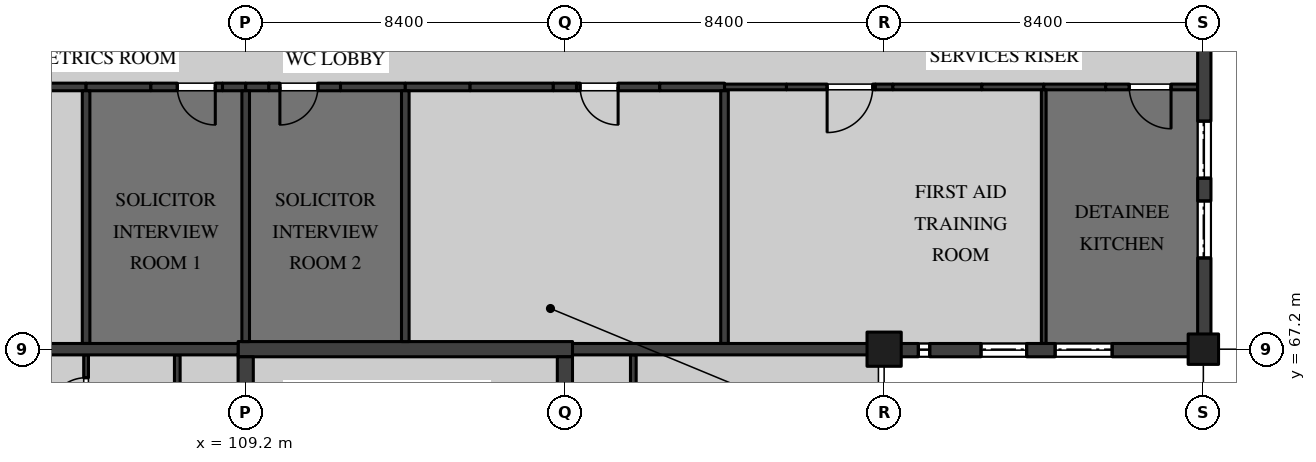
"""IFC4 building model, lengths in metres.
Left out: names, types, materials, properties, quantities, classifications, styles, units other than length and angle.
Written with IfcOpenShell. Run it as: python <this file> out.ifc"""

import sys

from ifc_helpers import new_model, si_unit, direction, frame, frame_2d, origin, origin_2d, place, context, subcontext, project, spatial, rectangle, extrude, element, fill, save


model = new_model("IFC4")
c1 = context("Model", 3, precision=1e-05, world=origin(), true_north=direction((0.0, 1.0)))
c2 = subcontext(c1, "Body", "Model", "MODEL_VIEW")
j1 = project(units=[si_unit("LENGTHUNIT", "METRE"), si_unit("PLANEANGLEUNIT", "RADIAN")], contexts=[c1])
p1 = place(None, origin())
s1 = spatial("IfcSite", under=j1, at=p1, CompositionType="ELEMENT")
p2 = place(p1, origin())
s2 = spatial("IfcBuilding", under=s1, at=p2, CompositionType="ELEMENT")
p3 = place(p2, frame((0.0, 0.0, 5.4)))
s3 = spatial("IfcBuildingStorey", under=s2, at=p3, CompositionType="ELEMENT", Elevation=5.4)
p4 = place(p3, frame((126.0, 67.2, 0.0), z_axis=(0.0, 0.0, 1.0), x_axis=(1.0, 0.0, 0.0)))
e1 = element("IfcColumn", 1, at=p4, inside=s3, PredefinedType="COLUMN", context=c2, shape_type="SweptSolid", body=[
    extrude(rectangle(XDim=0.9, YDim=0.9, at=origin_2d()), origin(), (0.0, 0.0, 1.0), 4.37),
])
p5 = place(p3, frame((134.4, 67.2, 0.0), z_axis=(0.0, 0.0, 1.0), x_axis=(1.0, 0.0, 0.0)))
e2 = element("IfcColumn", 2, at=p5, inside=s3, PredefinedType="COLUMN", context=c2, shape_type="SweptSolid", body=[
    extrude(rectangle(XDim=0.8, YDim=0.8, at=origin_2d()), origin(), (0.0, 0.0, 1.0), 4.37),
])
p6 = place(p3, frame((109.0, 67.2, 0.0), z_axis=(0.0, 0.0, 1.0), x_axis=(1.0, 0.0, 0.0)))
e3 = element("IfcWall", 3, at=p6, inside=s3, PredefinedType="SHEAR", context=c2, shape_type="SweptSolid", body=[
    extrude(rectangle(XDim=8.8, YDim=0.4, at=frame_2d((4.4, 0.0))), origin(), (0.0, 0.0, 1.0), 4.37),
])
p7 = place(p3, frame((109.2, 59.0, 0.0), z_axis=(0.0, 0.0, 1.0), x_axis=(0.0, 1.0, 0.0)))
e4 = element("IfcWall", 4, at=p7, inside=s3, PredefinedType="SHEAR", context=c2, shape_type="SweptSolid", body=[
    extrude(rectangle(XDim=8.0, YDim=0.4, at=frame_2d((4.0, 0.0))), origin(), (0.0, 0.0, 1.0), 4.37),
])
p8 = place(p7, frame((2.925, 0.0, 0.0)))
e5 = element("IfcOpeningElement", 5, at=p8, cuts=e4, PredefinedType="OPENING", context=c2, shape_type="SweptSolid", body=[
    extrude(rectangle(XDim=1.2, YDim=2.1, at=frame_2d((0.6, 1.05))), frame((0.0, 0.21, 0.0), z_axis=(0.0, -1.0, 0.0), x_axis=(1.0, 0.0, 0.0)), (0.0, 0.0, 1.0), 0.42),
])
p9 = place(p3, frame((117.6, 59.0, 0.0), z_axis=(0.0, 0.0, 1.0), x_axis=(0.0, 1.0, 0.0)))
e6 = element("IfcWall", 6, at=p9, inside=s3, PredefinedType="SHEAR", context=c2, shape_type="SweptSolid", body=[
    extrude(rectangle(XDim=8.0, YDim=0.4, at=frame_2d((4.0, 0.0))), origin(), (0.0, 0.0, 1.0), 4.37),
])
p10 = place(p9, frame((2.925, 0.0, 0.0)))
e7 = element("IfcOpeningElement", 7, at=p10, cuts=e6, PredefinedType="OPENING", context=c2, shape_type="SweptSolid", body=[
    extrude(rectangle(XDim=1.2, YDim=2.1, at=frame_2d((0.6, 1.05))), frame((0.0, 0.21, 0.0), z_axis=(0.0, -1.0, 0.0), x_axis=(1.0, 0.0, 0.0)), (0.0, 0.0, 1.0), 0.42),
])
p11 = place(p3, frame((119.4, 59.03, 0.0), z_axis=(0.0, 0.0, 1.0), x_axis=(0.0, 1.0, 0.0)))
e8 = element("IfcWall", 8, at=p11, inside=s3, PredefinedType="PARTITIONING", context=c2, shape_type="SweptSolid", body=[
    extrude(rectangle(XDim=8.02, YDim=0.15, at=frame_2d((4.01, 0.0))), origin(), (0.0, 0.0, 1.0), 4.37),
])
p12 = place(p11, frame((0.17, 0.0, 0.0)))
e9 = element("IfcOpeningElement", 9, at=p12, cuts=e8, PredefinedType="OPENING", context=c2, shape_type="SweptSolid", body=[
    extrude(rectangle(XDim=1.35, YDim=2.1, at=frame_2d((0.675, 1.05))), frame((0.0, 0.085, 0.0), z_axis=(0.0, -1.0, 0.0), x_axis=(1.0, 0.0, 0.0)), (0.0, 0.0, 1.0), 0.17),
])
p13 = place(p3, frame((107.4, 59.26, 0.0), z_axis=(0.0, 0.0, 1.0), x_axis=(0.0, 1.0, 0.0)))
e10 = element("IfcWall", 10, at=p13, inside=s3, PredefinedType="PARTITIONING", context=c2, shape_type="SweptSolid", body=[
    extrude(rectangle(XDim=7.79, YDim=0.15, at=frame_2d((3.895, 0.0))), origin(), (0.0, 0.0, 1.0), 4.37),
])
p14 = place(p13, frame((2.09, 0.0, 0.0)))
e11 = element("IfcOpeningElement", 11, at=p14, cuts=e10, PredefinedType="OPENING", context=c2, shape_type="SweptSolid", body=[
    extrude(rectangle(XDim=0.9, YDim=2.1, at=frame_2d((0.45, 1.05))), frame((0.0, 0.085, 0.0), z_axis=(0.0, -1.0, 0.0), x_axis=(1.0, 0.0, 0.0)), (0.0, 0.0, 1.0), 0.17),
])
p15 = place(p3, frame((105.0, 64.8, 0.0), z_axis=(0.0, 0.0, 1.0), x_axis=(0.0, 1.0, 0.0)))
e12 = element("IfcWall", 12, at=p15, inside=s3, PredefinedType="PARTITIONING", context=c2, shape_type="SweptSolid", body=[
    extrude(rectangle(XDim=2.25, YDim=0.125, at=frame_2d((1.125, 0.0))), origin(), (0.0, 0.0, 1.0), 4.37),
])
p16 = place(p15, frame((0.65, 0.0, 0.0)))
e13 = element("IfcOpeningElement", 13, at=p16, cuts=e12, PredefinedType="OPENING", context=c2, shape_type="SweptSolid", body=[
    extrude(rectangle(XDim=1.0, YDim=2.1, at=frame_2d((0.5, 1.05))), frame((0.0, 0.073, 0.0), z_axis=(0.0, -1.0, 0.0), x_axis=(1.0, 0.0, 0.0)), (0.0, 0.0, 1.0), 0.145),
])
for number, where, z_axis, x_axis in (
    (14, (103.295, 74.1, 0.0), (0.0, 0.0, 1.0), (1.0, 0.0, 0.0)),
    (15, (105.0, 74.1, 0.0), (0.0, 0.0, 1.0), (1.0, 0.0, 0.0)),
):
    element("IfcWall", number, at=place(p3, frame(where, z_axis=z_axis, x_axis=x_axis)), inside=s3, PredefinedType="PARTITIONING", context=c2, shape_type="SweptSolid", body=[
        extrude(rectangle(XDim=1.705, YDim=0.2, at=frame_2d((0.853, 0.0))), origin(), (0.0, 0.0, 1.0), 3.895),
    ])
p17 = place(p3, frame((106.705, 74.1, 0.0), z_axis=(0.0, 0.0, 1.0), x_axis=(1.0, 0.0, 0.0)))
e16 = element("IfcWall", 16, at=p17, inside=s3, PredefinedType="PARTITIONING", context=c2, shape_type="SweptSolid", body=[
    extrude(rectangle(XDim=1.885, YDim=0.2, at=frame_2d((0.942, 0.0))), origin(), (0.0, 0.0, 1.0), 4.37),
])
p18 = place(p17, frame((0.695, 0.0, 0.0)))
e17 = element("IfcOpeningElement", 17, at=p18, cuts=e16, PredefinedType="OPENING", context=c2, shape_type="SweptSolid", body=[
    extrude(rectangle(XDim=1.0, YDim=2.1, at=frame_2d((0.5, 1.05))), frame((0.0, 0.11, 0.0), z_axis=(0.0, -1.0, 0.0), x_axis=(1.0, 0.0, 0.0)), (0.0, 0.0, 1.0), 0.22),
])
p19 = place(p3, frame((108.59, 74.1, 0.0), z_axis=(0.0, 0.0, 1.0), x_axis=(1.0, 0.0, 0.0)))
e18 = element("IfcWall", 18, at=p19, inside=s3, PredefinedType="PARTITIONING", context=c2, shape_type="SweptSolid", body=[
    extrude(rectangle(XDim=0.61, YDim=0.2, at=frame_2d((0.305, 0.0))), origin(), (0.0, 0.0, 1.0), 3.746),
])
p20 = place(p3, frame((109.2, 74.1, 0.0), z_axis=(0.0, 0.0, 1.0), x_axis=(1.0, 0.0, 0.0)))
e19 = element("IfcWall", 19, at=p20, inside=s3, PredefinedType="PARTITIONING", context=c2, shape_type="SweptSolid", body=[
    extrude(rectangle(XDim=0.61, YDim=0.2, at=frame_2d((0.305, 0.0))), origin(), (0.0, 0.0, 1.0), 3.746),
])
p21 = place(p3, frame((109.81, 74.1, 0.0), z_axis=(0.0, 0.0, 1.0), x_axis=(1.0, 0.0, 0.0)))
e20 = element("IfcWall", 20, at=p21, inside=s3, PredefinedType="PARTITIONING", context=c2, shape_type="SweptSolid", body=[
    extrude(rectangle(XDim=1.885, YDim=0.2, at=frame_2d((0.942, 0.0))), origin(), (0.0, 0.0, 1.0), 4.37),
])
p22 = place(p21, frame((0.29, 0.0, 0.0)))
e21 = element("IfcOpeningElement", 21, at=p22, cuts=e20, PredefinedType="OPENING", context=c2, shape_type="SweptSolid", body=[
    extrude(rectangle(XDim=1.0, YDim=2.1, at=frame_2d((0.5, 1.05))), frame((0.0, 0.11, 0.0), z_axis=(0.0, -1.0, 0.0), x_axis=(1.0, 0.0, 0.0)), (0.0, 0.0, 1.0), 0.22),
])
p23 = place(p3, frame((111.695, 74.1, 0.0), z_axis=(0.0, 0.0, 1.0), x_axis=(1.0, 0.0, 0.0)))
e22 = element("IfcWall", 22, at=p23, inside=s3, PredefinedType="PARTITIONING", context=c2, shape_type="SweptSolid", body=[
    extrude(rectangle(XDim=1.705, YDim=0.2, at=frame_2d((0.853, 0.0))), origin(), (0.0, 0.0, 1.0), 3.895),
])
p24 = place(p3, frame((113.4, 74.1, 0.0), z_axis=(0.0, 0.0, 1.0), x_axis=(1.0, 0.0, 0.0)))
e23 = element("IfcWall", 23, at=p24, inside=s3, PredefinedType="PARTITIONING", context=c2, shape_type="SweptSolid", body=[
    extrude(rectangle(XDim=1.705, YDim=0.2, at=frame_2d((0.853, 0.0))), origin(), (0.0, 0.0, 1.0), 3.895),
])
p25 = place(p3, frame((115.105, 74.1, 0.0), z_axis=(0.0, 0.0, 1.0), x_axis=(1.0, 0.0, 0.0)))
e24 = element("IfcWall", 24, at=p25, inside=s3, PredefinedType="PARTITIONING", context=c2, shape_type="SweptSolid", body=[
    extrude(rectangle(XDim=2.19, YDim=0.2, at=frame_2d((1.095, 0.0))), origin(), (0.0, 0.0, 1.0), 4.37),
])
p26 = place(p3, frame((117.295, 74.1, 0.0), z_axis=(0.0, 0.0, 1.0), x_axis=(1.0, 0.0, 0.0)))
e25 = element("IfcWall", 25, at=p26, inside=s3, PredefinedType="PARTITIONING", context=c2, shape_type="SweptSolid", body=[
    extrude(rectangle(XDim=0.61, YDim=0.2, at=frame_2d((0.305, 0.0))), origin(), (0.0, 0.0, 1.0), 3.746),
])
p27 = place(p3, frame((117.905, 74.1, 0.0), z_axis=(0.0, 0.0, 1.0), x_axis=(1.0, 0.0, 0.0)))
e26 = element("IfcWall", 26, at=p27, inside=s3, PredefinedType="PARTITIONING", context=c2, shape_type="SweptSolid", body=[
    extrude(rectangle(XDim=2.19, YDim=0.2, at=frame_2d((1.095, 0.0))), origin(), (0.0, 0.0, 1.0), 4.37),
])
p28 = place(p27, frame((0.095, 0.0, 0.0)))
e27 = element("IfcOpeningElement", 27, at=p28, cuts=e26, PredefinedType="OPENING", context=c2, shape_type="SweptSolid", body=[
    extrude(rectangle(XDim=1.0, YDim=2.1, at=frame_2d((0.5, 1.05))), frame((0.0, 0.11, 0.0), z_axis=(0.0, -1.0, 0.0), x_axis=(1.0, 0.0, 0.0)), (0.0, 0.0, 1.0), 0.22),
])
p29 = place(p3, frame((120.095, 74.1, 0.0), z_axis=(0.0, 0.0, 1.0), x_axis=(1.0, 0.0, 0.0)))
e28 = element("IfcWall", 28, at=p29, inside=s3, PredefinedType="PARTITIONING", context=c2, shape_type="SweptSolid", body=[
    extrude(rectangle(XDim=1.705, YDim=0.2, at=frame_2d((0.853, 0.0))), origin(), (0.0, 0.0, 1.0), 3.895),
])
p30 = place(p3, frame((121.8, 74.1, 0.0), z_axis=(0.0, 0.0, 1.0), x_axis=(1.0, 0.0, 0.0)))
e29 = element("IfcWall", 29, at=p30, inside=s3, PredefinedType="PARTITIONING", context=c2, shape_type="SweptSolid", body=[
    extrude(rectangle(XDim=1.63, YDim=0.15, at=frame_2d((0.815, 0.0))), origin(), (0.0, 0.0, 1.0), 3.895),
])
p31 = place(p3, frame((123.43, 74.1, 0.0), z_axis=(0.0, 0.0, 1.0), x_axis=(1.0, 0.0, 0.0)))
e30 = element("IfcWall", 30, at=p31, inside=s3, PredefinedType="PARTITIONING", context=c2, shape_type="SweptSolid", body=[
    extrude(rectangle(XDim=2.34, YDim=0.15, at=frame_2d((1.17, 0.0))), origin(), (0.0, 0.0, 1.0), 4.37),
])
p32 = place(p31, frame((1.07, 0.0, 0.0)))
e31 = element("IfcOpeningElement", 31, at=p32, cuts=e30, PredefinedType="OPENING", context=c2, shape_type="SweptSolid", body=[
    extrude(rectangle(XDim=1.2, YDim=2.4, at=frame_2d((0.6, 1.2))), frame((0.0, 0.085, 0.0), z_axis=(0.0, -1.0, 0.0), x_axis=(1.0, 0.0, 0.0)), (0.0, 0.0, 1.0), 0.17),
])
p33 = place(p3, frame((125.77, 74.1, 0.0), z_axis=(0.0, 0.0, 1.0), x_axis=(1.0, 0.0, 0.0)))
e32 = element("IfcWall", 32, at=p33, inside=s3, PredefinedType="PARTITIONING", context=c2, shape_type="SweptSolid", body=[
    extrude(rectangle(XDim=0.46, YDim=0.15, at=frame_2d((0.23, 0.0))), origin(), (0.0, 0.0, 1.0), 3.746),
])
p34 = place(p3, frame((126.23, 74.1, 0.0), z_axis=(0.0, 0.0, 1.0), x_axis=(1.0, 0.0, 0.0)))
e33 = element("IfcWall", 33, at=p34, inside=s3, PredefinedType="PARTITIONING", context=c2, shape_type="SweptSolid", body=[
    extrude(rectangle(XDim=2.34, YDim=0.15, at=frame_2d((1.17, 0.0))), origin(), (0.0, 0.0, 1.0), 4.37),
])
p35 = place(p3, frame((128.57, 74.1, 0.0), z_axis=(0.0, 0.0, 1.0), x_axis=(1.0, 0.0, 0.0)))
e34 = element("IfcWall", 34, at=p35, inside=s3, PredefinedType="PARTITIONING", context=c2, shape_type="SweptSolid", body=[
    extrude(rectangle(XDim=1.63, YDim=0.15, at=frame_2d((0.815, 0.0))), origin(), (0.0, 0.0, 1.0), 3.895),
])
p36 = place(p3, frame((130.2, 74.1, 0.0), z_axis=(0.0, 0.0, 1.0), x_axis=(1.0, 0.0, 0.0)))
e35 = element("IfcWall", 35, at=p36, inside=s3, PredefinedType="PARTITIONING", context=c2, shape_type="SweptSolid", body=[
    extrude(rectangle(XDim=1.63, YDim=0.15, at=frame_2d((0.815, 0.0))), origin(), (0.0, 0.0, 1.0), 3.895),
])
p37 = place(p3, frame((131.83, 74.1, 0.0), z_axis=(0.0, 0.0, 1.0), x_axis=(1.0, 0.0, 0.0)))
e36 = element("IfcWall", 36, at=p37, inside=s3, PredefinedType="PARTITIONING", context=c2, shape_type="SweptSolid", body=[
    extrude(rectangle(XDim=2.42, YDim=0.15, at=frame_2d((1.21, 0.0))), origin(), (0.0, 0.0, 1.0), 4.37),
])
p38 = place(p37, frame((0.62, 0.0, 0.0)))
e37 = element("IfcOpeningElement", 37, at=p38, cuts=e36, PredefinedType="OPENING", context=c2, shape_type="SweptSolid", body=[
    extrude(rectangle(XDim=1.1, YDim=2.1, at=frame_2d((0.55, 1.05))), frame((0.0, 0.085, 0.0), z_axis=(0.0, -1.0, 0.0), x_axis=(1.0, 0.0, 0.0)), (0.0, 0.0, 1.0), 0.17),
])
p39 = place(p3, frame((105.0, 67.35, 0.0), z_axis=(0.0, 0.0, 1.0), x_axis=(0.0, 1.0, 0.0)))
e38 = element("IfcWall", 38, at=p39, inside=s3, PredefinedType="PARTITIONING", context=c2, shape_type="SweptSolid", body=[
    extrude(rectangle(XDim=6.65, YDim=0.2, at=frame_2d((3.325, 0.0))), origin(), (0.0, 0.0, 1.0), 4.37),
])
p40 = place(p3, frame((109.2, 67.4, 0.0), z_axis=(0.0, 0.0, 1.0), x_axis=(0.0, 1.0, 0.0)))
e39 = element("IfcWall", 39, at=p40, inside=s3, PredefinedType="PARTITIONING", context=c2, shape_type="SweptSolid", body=[
    extrude(rectangle(XDim=6.6, YDim=0.2, at=frame_2d((3.3, 0.0))), origin(), (0.0, 0.0, 1.0), 3.746),
])
p41 = place(p3, frame((113.4, 67.4, 0.0), z_axis=(0.0, 0.0, 1.0), x_axis=(0.0, 1.0, 0.0)))
e40 = element("IfcWall", 40, at=p41, inside=s3, PredefinedType="PARTITIONING", context=c2, shape_type="SweptSolid", body=[
    extrude(rectangle(XDim=6.6, YDim=0.2, at=frame_2d((3.3, 0.0))), origin(), (0.0, 0.0, 1.0), 4.37),
])
p42 = place(p3, frame((121.8, 67.35, 0.0), z_axis=(0.0, 0.0, 1.0), x_axis=(0.0, 1.0, 0.0)))
e41 = element("IfcWall", 41, at=p42, inside=s3, PredefinedType="PARTITIONING", context=c2, shape_type="SweptSolid", body=[
    extrude(rectangle(XDim=6.65, YDim=0.2, at=frame_2d((3.325, 0.0))), origin(), (0.0, 0.0, 1.0), 4.37),
])
p43 = place(p3, frame((130.2, 67.35, 0.0), z_axis=(0.0, 0.0, 1.0), x_axis=(0.0, 1.0, 0.0)))
e42 = element("IfcWall", 42, at=p43, inside=s3, PredefinedType="PARTITIONING", context=c2, shape_type="SweptSolid", body=[
    extrude(rectangle(XDim=6.675, YDim=0.125, at=frame_2d((3.337, 0.0))), origin(), (0.0, 0.0, 1.0), 4.37),
])
p44 = place(p3, frame((126.43, 67.175, 0.0), z_axis=(0.0, 0.0, 1.0), x_axis=(1.0, 0.0, 0.0)))
e43 = element("IfcWall", 43, at=p44, inside=s3, PredefinedType="SOLIDWALL", context=c2, shape_type="SweptSolid", body=[
    extrude(rectangle(XDim=7.59, YDim=0.35, at=frame_2d((3.795, 0.0))), origin(), (0.0, 0.0, 1.0), 3.746),
])
p45 = place(p44, frame((0.47, 0.0, 1.5)))
e44 = element("IfcOpeningElement", 44, at=p45, cuts=e43, PredefinedType="OPENING", context=c2, shape_type="SweptSolid", body=[
    extrude(rectangle(XDim=0.3, YDim=1.5, at=frame_2d((0.15, 0.75))), frame((0.0, 0.185, 0.0), z_axis=(0.0, -1.0, 0.0), x_axis=(1.0, 0.0, 0.0)), (0.0, 0.0, 1.0), 0.37),
])
p46 = place(p44, frame((2.12, 0.0, 1.5)))
e45 = element("IfcOpeningElement", 45, at=p46, cuts=e43, PredefinedType="OPENING", context=c2, shape_type="SweptSolid", body=[
    extrude(rectangle(XDim=1.2, YDim=1.5, at=frame_2d((0.6, 0.75))), frame((0.0, 0.185, 0.0), z_axis=(0.0, -1.0, 0.0), x_axis=(1.0, 0.0, 0.0)), (0.0, 0.0, 1.0), 0.37),
])
p47 = place(p44, frame((4.07, 0.0, 1.5)))
e46 = element("IfcOpeningElement", 46, at=p47, cuts=e43, PredefinedType="OPENING", context=c2, shape_type="SweptSolid", body=[
    extrude(rectangle(XDim=1.5, YDim=1.5, at=frame_2d((0.75, 0.75))), frame((0.0, 0.185, 0.0), z_axis=(0.0, -1.0, 0.0), x_axis=(1.0, 0.0, 0.0)), (0.0, 0.0, 1.0), 0.37),
])
p48 = place(p3, frame((134.425, 67.58, 0.0), z_axis=(0.0, 0.0, 1.0), x_axis=(0.0, 1.0, 0.0)))
e47 = element("IfcWall", 47, at=p48, inside=s3, PredefinedType="SOLIDWALL", context=c2, shape_type="SweptSolid", body=[
    extrude(rectangle(XDim=7.82, YDim=0.35, at=frame_2d((3.91, 0.0))), origin(), (0.0, 0.0, 1.0), 3.746),
])
p49 = place(p48, frame((2.02, 0.0, 1.5)))
e48 = element("IfcOpeningElement", 48, at=p49, cuts=e47, PredefinedType="OPENING", context=c2, shape_type="SweptSolid", body=[
    extrude(rectangle(XDim=1.5, YDim=1.65, at=frame_2d((0.75, 0.825))), frame((0.0, 0.185, 0.0), z_axis=(0.0, -1.0, 0.0), x_axis=(1.0, 0.0, 0.0)), (0.0, 0.0, 1.0), 0.37),
])
p50 = place(p48, frame((4.12, 0.0, 1.5)))
e49 = element("IfcOpeningElement", 49, at=p50, cuts=e47, PredefinedType="OPENING", context=c2, shape_type="SweptSolid", body=[
    extrude(rectangle(XDim=1.5, YDim=1.65, at=frame_2d((0.75, 0.825))), frame((0.0, 0.185, 0.0), z_axis=(0.0, -1.0, 0.0), x_axis=(1.0, 0.0, 0.0)), (0.0, 0.0, 1.0), 0.37),
])
for number, where, z_axis, x_axis in (
    (50, (125.57, 67.2, 0.0), (0.0, 0.0, 1.0), (-1.0, 0.0, 0.0)),
    (51, (109.0, 67.2, 0.0), (0.0, 0.0, 1.0), (-1.0, 0.0, 0.0)),
):
    element("IfcWall", number, at=place(p3, frame(where, z_axis=z_axis, x_axis=x_axis)), inside=s3, PredefinedType="SOLIDWALL", context=c2, shape_type="SweptSolid", body=[
        extrude(rectangle(XDim=7.77, YDim=0.3, at=frame_2d((3.885, 0.0))), origin(), (0.0, 0.0, 1.0), 3.746),
    ])
p51 = place(p16, origin())
e52 = element("IfcDoor", 52, at=p51, inside=s3, OperationType="SINGLE_SWING_RIGHT", PredefinedType="DOOR", context=c2, shape_type="SweptSolid", body=[
    extrude(rectangle(XDim=1.0, YDim=2.1, at=frame_2d((0.5, 1.05))), frame((0.0, 0.02, 0.0), z_axis=(0.0, -1.0, 0.0), x_axis=(1.0, 0.0, 0.0)), (0.0, 0.0, 1.0), 0.04),
])
fill(e13, e52)
p52 = place(p18, frame((1.0, 0.0, 0.0), z_axis=(0.0, 0.0, 1.0), x_axis=(-1.0, 0.0, 0.0)))
e53 = element("IfcDoor", 53, at=p52, inside=s3, OperationType="SINGLE_SWING_RIGHT", PredefinedType="DOOR", context=c2, shape_type="SweptSolid", body=[
    extrude(rectangle(XDim=1.0, YDim=2.1, at=frame_2d((0.5, 1.05))), frame((0.0, 0.045, 0.0), z_axis=(0.0, -1.0, 0.0), x_axis=(1.0, 0.0, 0.0)), (0.0, 0.0, 1.0), 0.09),
])
fill(e17, e53)
p53 = place(p22, frame((1.0, 0.0, 0.0), z_axis=(0.0, 0.0, 1.0), x_axis=(-1.0, 0.0, 0.0)))
e54 = element("IfcDoor", 54, at=p53, inside=s3, OperationType="SINGLE_SWING_LEFT", PredefinedType="DOOR", context=c2, shape_type="SweptSolid", body=[
    extrude(rectangle(XDim=1.0, YDim=2.1, at=frame_2d((0.5, 1.05))), frame((0.0, 0.045, 0.0), z_axis=(0.0, -1.0, 0.0), x_axis=(1.0, 0.0, 0.0)), (0.0, 0.0, 1.0), 0.09),
])
fill(e21, e54)
p54 = place(p28, frame((1.0, 0.0, 0.0), z_axis=(0.0, 0.0, 1.0), x_axis=(-1.0, 0.0, 0.0)))
e55 = element("IfcDoor", 55, at=p54, inside=s3, OperationType="SINGLE_SWING_RIGHT", PredefinedType="DOOR", context=c2, shape_type="SweptSolid", body=[
    extrude(rectangle(XDim=1.0, YDim=2.1, at=frame_2d((0.5, 1.05))), frame((0.0, 0.045, 0.0), z_axis=(0.0, -1.0, 0.0), x_axis=(1.0, 0.0, 0.0)), (0.0, 0.0, 1.0), 0.09),
])
fill(e27, e55)
p55 = place(p32, frame((1.2, 0.0, 0.0), z_axis=(0.0, 0.0, 1.0), x_axis=(-1.0, 0.0, 0.0)))
e56 = element("IfcDoor", 56, at=p55, inside=s3, OperationType="SINGLE_SWING_LEFT", PredefinedType="DOOR", context=c2, shape_type="SweptSolid", body=[
    extrude(rectangle(XDim=1.2, YDim=2.4, at=frame_2d((0.6, 1.2))), frame((0.0, 0.025, 0.0), z_axis=(0.0, -1.0, 0.0), x_axis=(1.0, 0.0, 0.0)), (0.0, 0.0, 1.0), 0.05),
])
fill(e31, e56)
p56 = place(p38, frame((1.1, 0.0, 0.0), z_axis=(0.0, 0.0, 1.0), x_axis=(-1.0, 0.0, 0.0)))
e57 = element("IfcDoor", 57, at=p56, inside=s3, OperationType="SINGLE_SWING_RIGHT", PredefinedType="DOOR", context=c2, shape_type="SweptSolid", body=[
    extrude(rectangle(XDim=1.1, YDim=2.1, at=frame_2d((0.55, 1.05))), frame((0.0, 0.025, 0.0), z_axis=(0.0, -1.0, 0.0), x_axis=(1.0, 0.0, 0.0)), (0.0, 0.0, 1.0), 0.05),
])
fill(e37, e57)
p57 = place(p45, origin())
e58 = element("IfcWindow", 58, at=p57, inside=s3, PartitioningType="SINGLE_PANEL", PredefinedType="WINDOW", context=c2, shape_type="SweptSolid", body=[
    extrude(rectangle(XDim=0.3, YDim=1.5, at=frame_2d((0.15, 0.75))), frame((0.0, 0.05, 0.0), z_axis=(0.0, -1.0, 0.0), x_axis=(1.0, 0.0, 0.0)), (0.0, 0.0, 1.0), 0.1),
])
fill(e44, e58)
p58 = place(p46, origin())
e59 = element("IfcWindow", 59, at=p58, inside=s3, PartitioningType="SINGLE_PANEL", PredefinedType="WINDOW", context=c2, shape_type="SweptSolid", body=[
    extrude(rectangle(XDim=1.2, YDim=1.5, at=frame_2d((0.6, 0.75))), frame((0.0, 0.04, 0.0), z_axis=(0.0, -1.0, 0.0), x_axis=(1.0, 0.0, 0.0)), (0.0, 0.0, 1.0), 0.08),
])
fill(e45, e59)
p59 = place(p47, origin())
e60 = element("IfcWindow", 60, at=p59, inside=s3, PartitioningType="SINGLE_PANEL", PredefinedType="WINDOW", context=c2, shape_type="SweptSolid", body=[
    extrude(rectangle(XDim=1.5, YDim=1.5, at=frame_2d((0.75, 0.75))), frame((0.0, 0.04, 0.0), z_axis=(0.0, -1.0, 0.0), x_axis=(1.0, 0.0, 0.0)), (0.0, 0.0, 1.0), 0.08),
])
fill(e46, e60)
p60 = place(p49, origin())
e61 = element("IfcWindow", 61, at=p60, inside=s3, PartitioningType="SINGLE_PANEL", PredefinedType="WINDOW", context=c2, shape_type="SweptSolid", body=[
    extrude(rectangle(XDim=1.5, YDim=1.65, at=frame_2d((0.75, 0.825))), frame((0.0, 0.04, 0.0), z_axis=(0.0, -1.0, 0.0), x_axis=(1.0, 0.0, 0.0)), (0.0, 0.0, 1.0), 0.08),
])
fill(e48, e61)
p61 = place(p50, origin())
e62 = element("IfcWindow", 62, at=p61, inside=s3, PartitioningType="SINGLE_PANEL", PredefinedType="WINDOW", context=c2, shape_type="SweptSolid", body=[
    extrude(rectangle(XDim=1.5, YDim=1.65, at=frame_2d((0.75, 0.825))), frame((0.0, 0.04, 0.0), z_axis=(0.0, -1.0, 0.0), x_axis=(1.0, 0.0, 0.0)), (0.0, 0.0, 1.0), 0.08),
])
fill(e49, e62)
save(model, sys.argv[1])
